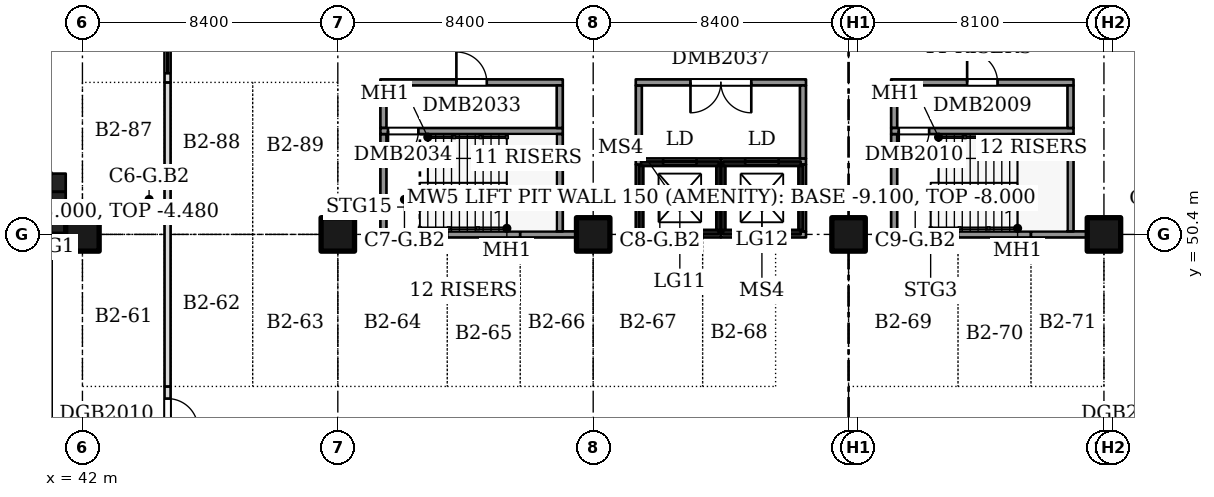
"""IFC4 building model, lengths in metres.
Left out: names, types, materials, properties, quantities, classifications, styles, units other than length and angle.
Written with IfcOpenShell. Run it as: python <this file> out.ifc"""

import sys

from ifc_helpers import new_model, si_unit, direction, frame, frame_2d, origin, origin_2d, place, context, subcontext, project, spatial, rectangle, extrude, element, fill, save


model = new_model("IFC4")
c1 = context("Model", 3, precision=1e-05, world=origin(), true_north=direction((0.0, 1.0)))
c2 = subcontext(c1, "Body", "Model", "MODEL_VIEW")
j1 = project(units=[si_unit("LENGTHUNIT", "METRE"), si_unit("PLANEANGLEUNIT", "RADIAN")], contexts=[c1])
p1 = place(None, origin())
s1 = spatial("IfcSite", under=j1, at=p1, CompositionType="ELEMENT")
p2 = place(p1, origin())
s2 = spatial("IfcBuilding", under=s1, at=p2, CompositionType="ELEMENT")
p3 = place(p2, frame((0.0, 0.0, -8.0)))
s3 = spatial("IfcBuildingStorey", under=s2, at=p3, CompositionType="ELEMENT", Elevation=-8.0)
for number, where, z_axis, x_axis in (
    (1, (42.0, 50.4, 0.0), (0.0, 0.0, 1.0), (1.0, 0.0, 0.0)),
    (2, (50.4, 50.4, 0.0), (0.0, 0.0, 1.0), (1.0, 0.0, 0.0)),
    (3, (58.8, 50.4, 0.0), (0.0, 0.0, 1.0), (1.0, 0.0, 0.0)),
    (4, (67.2, 50.4, 0.0), (0.0, 0.0, 1.0), (1.0, 0.0, 0.0)),
    (5, (75.6, 50.4, 0.0), (0.0, 0.0, 1.0), (1.0, 0.0, 0.0)),
):
    element("IfcColumn", number, at=place(p3, frame(where, z_axis=z_axis, x_axis=x_axis)), inside=s3, PredefinedType="COLUMN", context=c2, shape_type="SweptSolid", body=[
        extrude(rectangle(XDim=1.1, YDim=1.1, at=origin_2d()), origin(), (0.0, 0.0, 1.0), 3.7),
    ])
p4 = place(p3, frame((51.9, 50.5, 0.0), z_axis=(0.0, 0.0, 1.0), x_axis=(0.0, 1.0, 0.0)))
e6 = element("IfcWall", 6, at=p4, inside=s3, PredefinedType="SOLIDWALL", context=c2, shape_type="SweptSolid", body=[
    extrude(rectangle(XDim=3.2, YDim=0.2, at=frame_2d((1.6, 0.0))), origin(), (0.0, 0.0, 1.0), 3.7),
])
p5 = place(p3, frame((51.8, 50.4, 0.0), z_axis=(0.0, 0.0, 1.0), x_axis=(1.0, 0.0, 0.0)))
e7 = element("IfcWall", 7, at=p5, inside=s3, PredefinedType="SOLIDWALL", context=c2, shape_type="SweptSolid", body=[
    extrude(rectangle(XDim=2.2, YDim=0.2, at=frame_2d((1.1, 0.0))), origin(), (0.0, 0.0, 1.0), 3.7),
])
p6 = place(p3, frame((51.9, 53.9, 0.0), z_axis=(0.0, 0.0, 1.0), x_axis=(0.0, 1.0, 0.0)))
e8 = element("IfcWall", 8, at=p6, inside=s3, PredefinedType="SOLIDWALL", context=c2, shape_type="SweptSolid", body=[
    extrude(rectangle(XDim=1.4, YDim=0.2, at=frame_2d((0.7, 0.0))), origin(), (0.0, 0.0, 1.0), 3.7),
])
p7 = place(p3, frame((51.8, 53.8, 0.0), z_axis=(0.0, 0.0, 1.0), x_axis=(1.0, 0.0, 0.0)))
e9 = element("IfcWall", 9, at=p7, inside=s3, PredefinedType="SOLIDWALL", context=c2, shape_type="SweptSolid", body=[
    extrude(rectangle(XDim=6.0, YDim=0.2, at=frame_2d((3.0, 0.0))), origin(), (0.0, 0.0, 1.0), 3.7),
])
p8 = place(p7, frame((0.25, 0.0, 0.0)))
e10 = element("IfcOpeningElement", 10, at=p8, cuts=e9, PredefinedType="OPENING", context=c2, shape_type="SweptSolid", body=[
    extrude(rectangle(XDim=1.0, YDim=2.1, at=frame_2d((0.5, 1.05))), frame((0.0, 0.11, 0.0), z_axis=(0.0, -1.0, 0.0), x_axis=(1.0, 0.0, 0.0)), (0.0, 0.0, 1.0), 0.22),
])
p9 = place(p3, frame((51.8, 55.4, 0.0), z_axis=(0.0, 0.0, 1.0), x_axis=(1.0, 0.0, 0.0)))
e11 = element("IfcWall", 11, at=p9, inside=s3, PredefinedType="SOLIDWALL", context=c2, shape_type="SweptSolid", body=[
    extrude(rectangle(XDim=6.0, YDim=0.2, at=frame_2d((3.0, 0.0))), origin(), (0.0, 0.0, 1.0), 3.7),
])
p10 = place(p9, frame((2.5, 0.0, 0.0)))
e12 = element("IfcOpeningElement", 12, at=p10, cuts=e11, PredefinedType="OPENING", context=c2, shape_type="SweptSolid", body=[
    extrude(rectangle(XDim=1.0, YDim=2.1, at=frame_2d((0.5, 1.05))), frame((0.0, 0.11, 0.0), z_axis=(0.0, -1.0, 0.0), x_axis=(1.0, 0.0, 0.0)), (0.0, 0.0, 1.0), 0.22),
])
p11 = place(p3, frame((54.0, 50.4, 0.0), z_axis=(0.0, 0.0, 1.0), x_axis=(1.0, 0.0, 0.0)))
e13 = element("IfcWall", 13, at=p11, inside=s3, PredefinedType="SOLIDWALL", context=c2, shape_type="SweptSolid", body=[
    extrude(rectangle(XDim=2.4, YDim=0.2, at=frame_2d((1.2, 0.0))), origin(), (0.0, 0.0, 1.0), 3.7),
])
p12 = place(p3, frame((56.4, 50.4, 0.0), z_axis=(0.0, 0.0, 1.0), x_axis=(1.0, 0.0, 0.0)))
e14 = element("IfcWall", 14, at=p12, inside=s3, PredefinedType="SOLIDWALL", context=c2, shape_type="SweptSolid", body=[
    extrude(rectangle(XDim=1.85, YDim=0.2, at=frame_2d((0.925, 0.0))), origin(), (0.0, 0.0, 1.0), 3.7),
])
p13 = place(p3, frame((57.7, 50.5, 0.0), z_axis=(0.0, 0.0, 1.0), x_axis=(0.0, 1.0, 0.0)))
e15 = element("IfcWall", 15, at=p13, inside=s3, PredefinedType="SOLIDWALL", context=c2, shape_type="SweptSolid", body=[
    extrude(rectangle(XDim=3.2, YDim=0.2, at=frame_2d((1.6, 0.0))), origin(), (0.0, 0.0, 1.0), 3.7),
])
p14 = place(p3, frame((57.7, 53.9, 0.0), z_axis=(0.0, 0.0, 1.0), x_axis=(0.0, 1.0, 0.0)))
e16 = element("IfcWall", 16, at=p14, inside=s3, PredefinedType="SOLIDWALL", context=c2, shape_type="SweptSolid", body=[
    extrude(rectangle(XDim=1.4, YDim=0.2, at=frame_2d((0.7, 0.0))), origin(), (0.0, 0.0, 1.0), 3.7),
])
for number, where, z_axis, x_axis in (
    (17, (60.3, 50.5, 0.0), (0.0, 0.0, 1.0), (0.0, 1.0, 0.0)),
    (18, (60.2, 50.4, 0.0), (0.0, 0.0, 1.0), (1.0, 0.0, 0.0)),
):
    element("IfcWall", number, at=place(p3, frame(where, z_axis=z_axis, x_axis=x_axis)), inside=s3, PredefinedType="SOLIDWALL", context=c2, shape_type="SweptSolid", body=[
        extrude(rectangle(XDim=2.2, YDim=0.2, at=frame_2d((1.1, 0.0))), origin(), (0.0, 0.0, 1.0), 3.7),
    ])
p15 = place(p3, frame((60.3, 52.9, 0.0), z_axis=(0.0, 0.0, 1.0), x_axis=(0.0, 1.0, 0.0)))
e19 = element("IfcWall", 19, at=p15, inside=s3, PredefinedType="SOLIDWALL", context=c2, shape_type="SweptSolid", body=[
    extrude(rectangle(XDim=2.4, YDim=0.2, at=frame_2d((1.2, 0.0))), origin(), (0.0, 0.0, 1.0), 3.7),
])
p16 = place(p3, frame((60.2, 52.8, 0.0), z_axis=(0.0, 0.0, 1.0), x_axis=(1.0, 0.0, 0.0)))
e20 = element("IfcWall", 20, at=p16, inside=s3, PredefinedType="SOLIDWALL", context=c2, shape_type="SweptSolid", body=[
    extrude(rectangle(XDim=2.8, YDim=0.2, at=frame_2d((1.4, 0.0))), origin(), (0.0, 0.0, 1.0), 3.7),
])
p17 = place(p16, frame((0.9, 0.0, 0.0)))
e21 = element("IfcOpeningElement", 21, at=p17, cuts=e20, PredefinedType="OPENING", context=c2, shape_type="SweptSolid", body=[
    extrude(rectangle(XDim=1.1, YDim=2.1, at=frame_2d((0.55, 1.05))), frame((0.0, 0.11, 0.0), z_axis=(0.0, -1.0, 0.0), x_axis=(1.0, 0.0, 0.0)), (0.0, 0.0, 1.0), 0.22),
])
p18 = place(p3, frame((60.2, 55.4, 0.0), z_axis=(0.0, 0.0, 1.0), x_axis=(1.0, 0.0, 0.0)))
e22 = element("IfcWall", 22, at=p18, inside=s3, PredefinedType="SOLIDWALL", context=c2, shape_type="SweptSolid", body=[
    extrude(rectangle(XDim=5.6, YDim=0.2, at=frame_2d((2.8, 0.0))), origin(), (0.0, 0.0, 1.0), 3.7),
])
p19 = place(p18, frame((1.8, 0.0, 0.0)))
e23 = element("IfcOpeningElement", 23, at=p19, cuts=e22, PredefinedType="OPENING", context=c2, shape_type="SweptSolid", body=[
    extrude(rectangle(XDim=2.0, YDim=2.1, at=frame_2d((1.0, 1.05))), frame((0.0, 0.11, 0.0), z_axis=(0.0, -1.0, 0.0), x_axis=(1.0, 0.0, 0.0)), (0.0, 0.0, 1.0), 0.22),
])
p20 = place(p3, frame((62.4, 50.4, 0.0), z_axis=(0.0, 0.0, 1.0), x_axis=(1.0, 0.0, 0.0)))
e24 = element("IfcWall", 24, at=p20, inside=s3, PredefinedType="SOLIDWALL", context=c2, shape_type="SweptSolid", body=[
    extrude(rectangle(XDim=0.6, YDim=0.2, at=frame_2d((0.3, 0.0))), origin(), (0.0, 0.0, 1.0), 3.7),
])
p21 = place(p3, frame((63.0, 50.5, 0.0), z_axis=(0.0, 0.0, 1.0), x_axis=(0.0, 1.0, 0.0)))
e25 = element("IfcWall", 25, at=p21, inside=s3, PredefinedType="SOLIDWALL", context=c2, shape_type="SweptSolid", body=[
    extrude(rectangle(XDim=2.2, YDim=0.2, at=frame_2d((1.1, 0.0))), origin(), (0.0, 0.0, 1.0), 3.7),
])
p22 = place(p3, frame((63.0, 50.4, 0.0), z_axis=(0.0, 0.0, 1.0), x_axis=(1.0, 0.0, 0.0)))
e26 = element("IfcWall", 26, at=p22, inside=s3, PredefinedType="SOLIDWALL", context=c2, shape_type="SweptSolid", body=[
    extrude(rectangle(XDim=1.8, YDim=0.2, at=frame_2d((0.9, 0.0))), origin(), (0.0, 0.0, 1.0), 3.7),
])
p23 = place(p3, frame((63.0, 52.8, 0.0), z_axis=(0.0, 0.0, 1.0), x_axis=(1.0, 0.0, 0.0)))
e27 = element("IfcWall", 27, at=p23, inside=s3, PredefinedType="SOLIDWALL", context=c2, shape_type="SweptSolid", body=[
    extrude(rectangle(XDim=2.8, YDim=0.2, at=frame_2d((1.4, 0.0))), origin(), (0.0, 0.0, 1.0), 3.7),
])
p24 = place(p23, frame((0.8, 0.0, 0.0)))
e28 = element("IfcOpeningElement", 28, at=p24, cuts=e27, PredefinedType="OPENING", context=c2, shape_type="SweptSolid", body=[
    extrude(rectangle(XDim=1.1, YDim=2.1, at=frame_2d((0.55, 1.05))), frame((0.0, 0.11, 0.0), z_axis=(0.0, -1.0, 0.0), x_axis=(1.0, 0.0, 0.0)), (0.0, 0.0, 1.0), 0.22),
])
p25 = place(p3, frame((64.8, 50.4, 0.0), z_axis=(0.0, 0.0, 1.0), x_axis=(1.0, 0.0, 0.0)))
e29 = element("IfcWall", 29, at=p25, inside=s3, PredefinedType="SOLIDWALL", context=c2, shape_type="SweptSolid", body=[
    extrude(rectangle(XDim=1.0, YDim=0.2, at=frame_2d((0.5, 0.0))), origin(), (0.0, 0.0, 1.0), 3.7),
])
p26 = place(p3, frame((65.7, 50.5, 0.0), z_axis=(0.0, 0.0, 1.0), x_axis=(0.0, 1.0, 0.0)))
e30 = element("IfcWall", 30, at=p26, inside=s3, PredefinedType="SOLIDWALL", context=c2, shape_type="SweptSolid", body=[
    extrude(rectangle(XDim=2.2, YDim=0.2, at=frame_2d((1.1, 0.0))), origin(), (0.0, 0.0, 1.0), 3.7),
])
p27 = place(p3, frame((65.7, 52.9, 0.0), z_axis=(0.0, 0.0, 1.0), x_axis=(0.0, 1.0, 0.0)))
e31 = element("IfcWall", 31, at=p27, inside=s3, PredefinedType="SOLIDWALL", context=c2, shape_type="SweptSolid", body=[
    extrude(rectangle(XDim=2.4, YDim=0.2, at=frame_2d((1.2, 0.0))), origin(), (0.0, 0.0, 1.0), 3.7),
])
p28 = place(p3, frame((68.7, 50.5, 0.0), z_axis=(0.0, 0.0, 1.0), x_axis=(0.0, 1.0, 0.0)))
e32 = element("IfcWall", 32, at=p28, inside=s3, PredefinedType="SOLIDWALL", context=c2, shape_type="SweptSolid", body=[
    extrude(rectangle(XDim=3.2, YDim=0.2, at=frame_2d((1.6, 0.0))), origin(), (0.0, 0.0, 1.0), 3.7),
])
p29 = place(p3, frame((68.6, 50.4, 0.0), z_axis=(0.0, 0.0, 1.0), x_axis=(1.0, 0.0, 0.0)))
e33 = element("IfcWall", 33, at=p29, inside=s3, PredefinedType="SOLIDWALL", context=c2, shape_type="SweptSolid", body=[
    extrude(rectangle(XDim=2.2, YDim=0.2, at=frame_2d((1.1, 0.0))), origin(), (0.0, 0.0, 1.0), 3.7),
])
p30 = place(p3, frame((68.7, 53.9, 0.0), z_axis=(0.0, 0.0, 1.0), x_axis=(0.0, 1.0, 0.0)))
e34 = element("IfcWall", 34, at=p30, inside=s3, PredefinedType="SOLIDWALL", context=c2, shape_type="SweptSolid", body=[
    extrude(rectangle(XDim=1.4, YDim=0.2, at=frame_2d((0.7, 0.0))), origin(), (0.0, 0.0, 1.0), 3.7),
])
p31 = place(p3, frame((68.6, 53.8, 0.0), z_axis=(0.0, 0.0, 1.0), x_axis=(1.0, 0.0, 0.0)))
e35 = element("IfcWall", 35, at=p31, inside=s3, PredefinedType="SOLIDWALL", context=c2, shape_type="SweptSolid", body=[
    extrude(rectangle(XDim=6.0, YDim=0.2, at=frame_2d((3.0, 0.0))), origin(), (0.0, 0.0, 1.0), 3.7),
])
p32 = place(p31, frame((0.25, 0.0, 0.0)))
e36 = element("IfcOpeningElement", 36, at=p32, cuts=e35, PredefinedType="OPENING", context=c2, shape_type="SweptSolid", body=[
    extrude(rectangle(XDim=1.0, YDim=2.1, at=frame_2d((0.5, 1.05))), frame((0.0, 0.11, 0.0), z_axis=(0.0, -1.0, 0.0), x_axis=(1.0, 0.0, 0.0)), (0.0, 0.0, 1.0), 0.22),
])
p33 = place(p3, frame((68.6, 55.4, 0.0), z_axis=(0.0, 0.0, 1.0), x_axis=(1.0, 0.0, 0.0)))
e37 = element("IfcWall", 37, at=p33, inside=s3, PredefinedType="SOLIDWALL", context=c2, shape_type="SweptSolid", body=[
    extrude(rectangle(XDim=6.0, YDim=0.2, at=frame_2d((3.0, 0.0))), origin(), (0.0, 0.0, 1.0), 3.7),
])
p34 = place(p33, frame((2.5, 0.0, 0.0)))
e38 = element("IfcOpeningElement", 38, at=p34, cuts=e37, PredefinedType="OPENING", context=c2, shape_type="SweptSolid", body=[
    extrude(rectangle(XDim=1.0, YDim=2.1, at=frame_2d((0.5, 1.05))), frame((0.0, 0.11, 0.0), z_axis=(0.0, -1.0, 0.0), x_axis=(1.0, 0.0, 0.0)), (0.0, 0.0, 1.0), 0.22),
])
p35 = place(p3, frame((70.8, 50.4, 0.0), z_axis=(0.0, 0.0, 1.0), x_axis=(1.0, 0.0, 0.0)))
e39 = element("IfcWall", 39, at=p35, inside=s3, PredefinedType="SOLIDWALL", context=c2, shape_type="SweptSolid", body=[
    extrude(rectangle(XDim=2.4, YDim=0.2, at=frame_2d((1.2, 0.0))), origin(), (0.0, 0.0, 1.0), 3.7),
])
p36 = place(p3, frame((73.2, 50.4, 0.0), z_axis=(0.0, 0.0, 1.0), x_axis=(1.0, 0.0, 0.0)))
e40 = element("IfcWall", 40, at=p36, inside=s3, PredefinedType="SOLIDWALL", context=c2, shape_type="SweptSolid", body=[
    extrude(rectangle(XDim=1.85, YDim=0.2, at=frame_2d((0.925, 0.0))), origin(), (0.0, 0.0, 1.0), 3.7),
])
p37 = place(p3, frame((74.5, 50.5, 0.0), z_axis=(0.0, 0.0, 1.0), x_axis=(0.0, 1.0, 0.0)))
e41 = element("IfcWall", 41, at=p37, inside=s3, PredefinedType="SOLIDWALL", context=c2, shape_type="SweptSolid", body=[
    extrude(rectangle(XDim=3.2, YDim=0.2, at=frame_2d((1.6, 0.0))), origin(), (0.0, 0.0, 1.0), 3.7),
])
p38 = place(p3, frame((74.5, 53.9, 0.0), z_axis=(0.0, 0.0, 1.0), x_axis=(0.0, 1.0, 0.0)))
e42 = element("IfcWall", 42, at=p38, inside=s3, PredefinedType="SOLIDWALL", context=c2, shape_type="SweptSolid", body=[
    extrude(rectangle(XDim=1.4, YDim=0.2, at=frame_2d((0.7, 0.0))), origin(), (0.0, 0.0, 1.0), 3.7),
])
p39 = place(p3, frame((44.8, 38.6, 0.0), z_axis=(0.0, 0.0, 1.0), x_axis=(0.0, 1.0, 0.0)))
e43 = element("IfcWall", 43, at=p39, inside=s3, PredefinedType="PARTITIONING", context=c2, shape_type="SweptSolid", body=[
    extrude(rectangle(XDim=6.8, YDim=0.2, at=frame_2d((3.4, 0.0))), origin(), (0.0, 0.0, 1.0), 3.7),
])
p40 = place(p39, frame((0.3, 0.0, 0.0)))
e44 = element("IfcOpeningElement", 44, at=p40, cuts=e43, PredefinedType="OPENING", context=c2, shape_type="SweptSolid", body=[
    extrude(rectangle(XDim=4.8, YDim=2.4, at=frame_2d((2.4, 1.2))), frame((0.0, 0.11, 0.0), z_axis=(0.0, -1.0, 0.0), x_axis=(1.0, 0.0, 0.0)), (0.0, 0.0, 1.0), 0.22),
])
p41 = place(p39, frame((5.4, 0.0, 0.0)))
e45 = element("IfcOpeningElement", 45, at=p41, cuts=e43, PredefinedType="OPENING", context=c2, shape_type="SweptSolid", body=[
    extrude(rectangle(XDim=1.0, YDim=2.1, at=frame_2d((0.5, 1.05))), frame((0.0, 0.11, 0.0), z_axis=(0.0, -1.0, 0.0), x_axis=(1.0, 0.0, 0.0)), (0.0, 0.0, 1.0), 0.22),
])
p42 = place(p3, frame((44.8, 45.4, 0.0), z_axis=(0.0, 0.0, 1.0), x_axis=(0.0, 1.0, 0.0)))
e46 = element("IfcWall", 46, at=p42, inside=s3, PredefinedType="PARTITIONING", context=c2, shape_type="SweptSolid", body=[
    extrude(rectangle(XDim=10.0, YDim=0.2, at=frame_2d((5.0, 0.0))), origin(), (0.0, 0.0, 1.0), 3.7),
])
p43 = place(p3, frame((44.8, 55.4, 0.0), z_axis=(0.0, 0.0, 1.0), x_axis=(0.0, 1.0, 0.0)))
e47 = element("IfcWall", 47, at=p43, inside=s3, PredefinedType="PARTITIONING", context=c2, shape_type="SweptSolid", body=[
    extrude(rectangle(XDim=6.8, YDim=0.2, at=frame_2d((3.4, 0.0))), origin(), (0.0, 0.0, 1.0), 3.7),
])
p44 = place(p43, frame((0.3, 0.0, 0.0)))
e48 = element("IfcOpeningElement", 48, at=p44, cuts=e47, PredefinedType="OPENING", context=c2, shape_type="SweptSolid", body=[
    extrude(rectangle(XDim=4.8, YDim=2.4, at=frame_2d((2.4, 1.2))), frame((0.0, 0.11, 0.0), z_axis=(0.0, -1.0, 0.0), x_axis=(1.0, 0.0, 0.0)), (0.0, 0.0, 1.0), 0.22),
])
p45 = place(p43, frame((5.4, 0.0, 0.0)))
e49 = element("IfcOpeningElement", 49, at=p45, cuts=e47, PredefinedType="OPENING", context=c2, shape_type="SweptSolid", body=[
    extrude(rectangle(XDim=1.0, YDim=2.1, at=frame_2d((0.5, 1.05))), frame((0.0, 0.11, 0.0), z_axis=(0.0, -1.0, 0.0), x_axis=(1.0, 0.0, 0.0)), (0.0, 0.0, 1.0), 0.22),
])
for number, where, z_axis, x_axis in (
    (50, (60.375, 50.475, -1.1), (0.0, 0.0, 1.0), (1.0, 0.0, 0.0)),
    (51, (60.375, 52.725, -1.1), (0.0, 0.0, 1.0), (1.0, 0.0, 0.0)),
):
    element("IfcWall", number, at=place(p3, frame(where, z_axis=z_axis, x_axis=x_axis)), inside=s3, PredefinedType="SOLIDWALL", context=c2, shape_type="SweptSolid", body=[
        extrude(rectangle(XDim=2.55, YDim=0.15, at=frame_2d((1.275, 0.0))), origin(), (0.0, 0.0, 1.0), 1.1),
    ])
for number, where, z_axis, x_axis in (
    (52, (60.375, 50.55, -1.1), (0.0, 0.0, 1.0), (0.0, 1.0, 0.0)),
    (53, (62.925, 50.55, -1.1), (0.0, 0.0, 1.0), (0.0, 1.0, 0.0)),
):
    element("IfcWall", number, at=place(p3, frame(where, z_axis=z_axis, x_axis=x_axis)), inside=s3, PredefinedType="SOLIDWALL", context=c2, shape_type="SweptSolid", body=[
        extrude(rectangle(XDim=2.1, YDim=0.15, at=frame_2d((1.05, 0.0))), origin(), (0.0, 0.0, 1.0), 1.1),
    ])
for number, where, z_axis, x_axis in (
    (54, (63.075, 50.475, -1.1), (0.0, 0.0, 1.0), (1.0, 0.0, 0.0)),
    (55, (63.075, 52.725, -1.1), (0.0, 0.0, 1.0), (1.0, 0.0, 0.0)),
):
    element("IfcWall", number, at=place(p3, frame(where, z_axis=z_axis, x_axis=x_axis)), inside=s3, PredefinedType="SOLIDWALL", context=c2, shape_type="SweptSolid", body=[
        extrude(rectangle(XDim=2.55, YDim=0.15, at=frame_2d((1.275, 0.0))), origin(), (0.0, 0.0, 1.0), 1.1),
    ])
for number, where, z_axis, x_axis in (
    (56, (63.075, 50.55, -1.1), (0.0, 0.0, 1.0), (0.0, 1.0, 0.0)),
    (57, (65.625, 50.55, -1.1), (0.0, 0.0, 1.0), (0.0, 1.0, 0.0)),
):
    element("IfcWall", number, at=place(p3, frame(where, z_axis=z_axis, x_axis=x_axis)), inside=s3, PredefinedType="SOLIDWALL", context=c2, shape_type="SweptSolid", body=[
        extrude(rectangle(XDim=2.1, YDim=0.15, at=frame_2d((1.05, 0.0))), origin(), (0.0, 0.0, 1.0), 1.1),
    ])
for number, where, z_axis, x_axis in (
    (58, (34.15, 50.15, 0.0), (0.0, 0.0, 1.0), (1.0, 0.0, 0.0)),
    (59, (34.15, 52.1, 0.0), (0.0, 0.0, 1.0), (1.0, 0.0, 0.0)),
):
    element("IfcWall", number, at=place(p3, frame(where, z_axis=z_axis, x_axis=x_axis)), inside=s3, PredefinedType="SOLIDWALL", context=c2, shape_type="SweptSolid", body=[
        extrude(rectangle(XDim=7.3, YDim=0.6, at=frame_2d((3.65, 0.0))), origin(), (0.0, 0.0, 1.0), 3.52),
    ])
p46 = place(p3, frame((41.15, 50.45, 0.0), z_axis=(0.0, 0.0, 1.0), x_axis=(0.0, 1.0, 0.0)))
e60 = element("IfcWall", 60, at=p46, inside=s3, PredefinedType="SOLIDWALL", context=c2, shape_type="SweptSolid", body=[
    extrude(rectangle(XDim=1.35, YDim=0.6, at=frame_2d((0.675, 0.0))), origin(), (0.0, 0.0, 1.0), 3.52),
])
p47 = place(p34, origin())
e61 = element("IfcDoor", 61, at=p47, inside=s3, OperationType="SINGLE_SWING_LEFT", PredefinedType="DOOR", context=c2, shape_type="SweptSolid", body=[
    extrude(rectangle(XDim=1.0, YDim=2.1, at=frame_2d((0.5, 1.05))), frame((0.0, 0.025, 0.0), z_axis=(0.0, -1.0, 0.0), x_axis=(1.0, 0.0, 0.0)), (0.0, 0.0, 1.0), 0.05),
])
fill(e38, e61)
p48 = place(p32, frame((1.0, 0.0, 0.0), z_axis=(0.0, 0.0, 1.0), x_axis=(-1.0, 0.0, 0.0)))
e62 = element("IfcDoor", 62, at=p48, inside=s3, OperationType="SINGLE_SWING_RIGHT", PredefinedType="DOOR", context=c2, shape_type="SweptSolid", body=[
    extrude(rectangle(XDim=1.0, YDim=2.1, at=frame_2d((0.5, 1.05))), frame((0.0, 0.025, 0.0), z_axis=(0.0, -1.0, 0.0), x_axis=(1.0, 0.0, 0.0)), (0.0, 0.0, 1.0), 0.05),
])
fill(e36, e62)
p49 = place(p10, origin())
e63 = element("IfcDoor", 63, at=p49, inside=s3, OperationType="SINGLE_SWING_LEFT", PredefinedType="DOOR", context=c2, shape_type="SweptSolid", body=[
    extrude(rectangle(XDim=1.0, YDim=2.1, at=frame_2d((0.5, 1.05))), frame((0.0, 0.025, 0.0), z_axis=(0.0, -1.0, 0.0), x_axis=(1.0, 0.0, 0.0)), (0.0, 0.0, 1.0), 0.05),
])
fill(e12, e63)
p50 = place(p8, frame((1.0, 0.0, 0.0), z_axis=(0.0, 0.0, 1.0), x_axis=(-1.0, 0.0, 0.0)))
e64 = element("IfcDoor", 64, at=p50, inside=s3, OperationType="SINGLE_SWING_RIGHT", PredefinedType="DOOR", context=c2, shape_type="SweptSolid", body=[
    extrude(rectangle(XDim=1.0, YDim=2.1, at=frame_2d((0.5, 1.05))), frame((0.0, 0.025, 0.0), z_axis=(0.0, -1.0, 0.0), x_axis=(1.0, 0.0, 0.0)), (0.0, 0.0, 1.0), 0.05),
])
fill(e10, e64)
p51 = place(p19, frame((2.0, 0.0, 0.0), z_axis=(0.0, 0.0, 1.0), x_axis=(-1.0, 0.0, 0.0)))
e65 = element("IfcDoor", 65, at=p51, inside=s3, OperationType="DOUBLE_DOOR_SINGLE_SWING", PredefinedType="DOOR", context=c2, shape_type="SweptSolid", body=[
    extrude(rectangle(XDim=2.0, YDim=2.1, at=frame_2d((1.0, 1.05))), frame((0.0, 0.025, 0.0), z_axis=(0.0, -1.0, 0.0), x_axis=(1.0, 0.0, 0.0)), (0.0, 0.0, 1.0), 0.05),
])
fill(e23, e65)
p52 = place(p17, origin())
e66 = element("IfcDoor", 66, at=p52, inside=s3, OperationType="SLIDING_TO_LEFT", PredefinedType="DOOR", context=c2, shape_type="SweptSolid", body=[
    extrude(rectangle(XDim=1.1, YDim=2.1, at=frame_2d((0.55, 1.05))), frame((0.0, 0.025, 0.0), z_axis=(0.0, -1.0, 0.0), x_axis=(1.0, 0.0, 0.0)), (0.0, 0.0, 1.0), 0.05),
])
fill(e21, e66)
p53 = place(p24, origin())
e67 = element("IfcDoor", 67, at=p53, inside=s3, OperationType="SLIDING_TO_LEFT", PredefinedType="DOOR", context=c2, shape_type="SweptSolid", body=[
    extrude(rectangle(XDim=1.1, YDim=2.1, at=frame_2d((0.55, 1.05))), frame((0.0, 0.025, 0.0), z_axis=(0.0, -1.0, 0.0), x_axis=(1.0, 0.0, 0.0)), (0.0, 0.0, 1.0), 0.05),
])
fill(e28, e67)
p54 = place(p41, frame((1.0, 0.0, 0.0), z_axis=(0.0, 0.0, 1.0), x_axis=(-1.0, 0.0, 0.0)))
e68 = element("IfcDoor", 68, at=p54, inside=s3, OperationType="SINGLE_SWING_RIGHT", PredefinedType="DOOR", context=c2, shape_type="SweptSolid", body=[
    extrude(rectangle(XDim=1.0, YDim=2.1, at=frame_2d((0.5, 1.05))), frame((0.0, 0.025, 0.0), z_axis=(0.0, -1.0, 0.0), x_axis=(1.0, 0.0, 0.0)), (0.0, 0.0, 1.0), 0.05),
])
fill(e45, e68)
p55 = place(p44, origin())
e69 = element("IfcDoor", 69, at=p55, inside=s3, OperationType="ROLLINGUP", PredefinedType="GATE", context=c2, shape_type="SweptSolid", body=[
    extrude(rectangle(XDim=4.8, YDim=2.4, at=frame_2d((2.4, 1.2))), frame((0.0, 0.025, 0.0), z_axis=(0.0, -1.0, 0.0), x_axis=(1.0, 0.0, 0.0)), (0.0, 0.0, 1.0), 0.05),
])
fill(e48, e69)
save(model, sys.argv[1])
